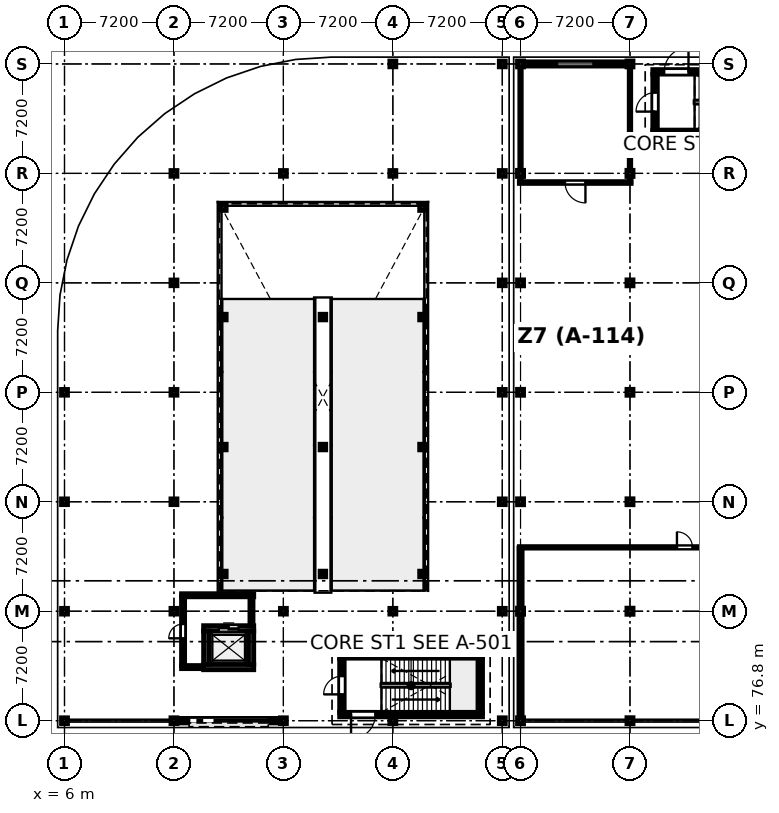
"""IFC4 building model, lengths in metres.
Left out: names, types, materials, properties, quantities, classifications, styles, units other than length and angle.
Written with IfcOpenShell. Run it as: python <this file> out.ifc"""

import sys

from ifc_helpers import new_model, si_unit, direction, frame, frame_2d, origin, origin_2d, place, context, subcontext, project, spatial, rectangle, i_section, extrude, element, fill, save


model = new_model("IFC4")
c1 = context("Model", 3, precision=1e-05, world=origin(), true_north=direction((0.0, 1.0)))
c2 = subcontext(c1, "Body", "Model", "MODEL_VIEW")
j1 = project(units=[si_unit("LENGTHUNIT", "METRE"), si_unit("PLANEANGLEUNIT", "RADIAN")], contexts=[c1])
p1 = place(None, origin())
s1 = spatial("IfcSite", under=j1, at=p1, CompositionType="ELEMENT")
p2 = place(p1, origin())
s2 = spatial("IfcBuilding", under=s1, at=p2, CompositionType="ELEMENT")
p3 = place(p2, origin())
s3 = spatial("IfcBuildingStorey", under=s2, at=p3, CompositionType="ELEMENT", Elevation=0.0)
for number, where, z_axis, x_axis in (
    (1, (6.0, 76.8, 0.0), (0.0, 0.0, 1.0), (1.0, 0.0, 0.0)),
    (2, (6.0, 84.0, 0.0), (0.0, 0.0, 1.0), (1.0, 0.0, 0.0)),
    (3, (6.0, 91.2, 0.0), (0.0, 0.0, 1.0), (1.0, 0.0, 0.0)),
    (4, (6.0, 98.4, 0.0), (0.0, 0.0, 1.0), (1.0, 0.0, 0.0)),
    (5, (13.2, 76.8, 0.0), (0.0, 0.0, 1.0), (1.0, 0.0, 0.0)),
    (6, (13.2, 84.0, 0.0), (0.0, 0.0, 1.0), (1.0, 0.0, 0.0)),
    (7, (13.2, 91.2, 0.0), (0.0, 0.0, 1.0), (1.0, 0.0, 0.0)),
    (8, (13.2, 98.4, 0.0), (0.0, 0.0, 1.0), (1.0, 0.0, 0.0)),
    (9, (13.2, 105.6, 0.0), (0.0, 0.0, 1.0), (1.0, 0.0, 0.0)),
    (10, (13.2, 112.8, 0.0), (0.0, 0.0, 1.0), (1.0, 0.0, 0.0)),
    (11, (20.4, 76.8, 0.0), (0.0, 0.0, 1.0), (1.0, 0.0, 0.0)),
    (12, (20.4, 84.0, 0.0), (0.0, 0.0, 1.0), (1.0, 0.0, 0.0)),
    (13, (20.4, 112.8, 0.0), (0.0, 0.0, 1.0), (1.0, 0.0, 0.0)),
    (14, (27.6, 76.8, 0.0), (0.0, 0.0, 1.0), (1.0, 0.0, 0.0)),
    (15, (27.6, 84.0, 0.0), (0.0, 0.0, 1.0), (1.0, 0.0, 0.0)),
    (16, (27.6, 112.8, 0.0), (0.0, 0.0, 1.0), (1.0, 0.0, 0.0)),
    (17, (27.6, 120.0, 0.0), (0.0, 0.0, 1.0), (1.0, 0.0, 0.0)),
    (18, (34.8, 76.8, 0.0), (0.0, 0.0, 1.0), (1.0, 0.0, 0.0)),
    (19, (34.8, 84.0, 0.0), (0.0, 0.0, 1.0), (1.0, 0.0, 0.0)),
    (20, (34.8, 91.2, 0.0), (0.0, 0.0, 1.0), (1.0, 0.0, 0.0)),
    (21, (34.8, 98.4, 0.0), (0.0, 0.0, 1.0), (1.0, 0.0, 0.0)),
    (22, (34.8, 105.6, 0.0), (0.0, 0.0, 1.0), (1.0, 0.0, 0.0)),
    (23, (34.8, 112.8, 0.0), (0.0, 0.0, 1.0), (1.0, 0.0, 0.0)),
    (24, (34.8, 120.0, 0.0), (0.0, 0.0, 1.0), (1.0, 0.0, 0.0)),
):
    element("IfcColumn", number, at=place(p3, frame(where, z_axis=z_axis, x_axis=x_axis)), inside=s3, PredefinedType="COLUMN", context=c2, shape_type="SweptSolid", body=[
        extrude(i_section(OverallWidth=0.396, OverallDepth=0.381, WebThickness=0.019, FlangeThickness=0.03, FilletRadius=0.015, at=origin_2d()), origin(), (0.0, 0.0, 1.0), 5.4),
    ])
for number, where, z_axis, x_axis in (
    (25, (16.45, 86.45, 0.0), (0.0, 0.0, 1.0), (1.0, 0.0, 0.0)),
    (26, (23.0, 86.45, 0.0), (0.0, 0.0, 1.0), (1.0, 0.0, 0.0)),
    (27, (29.55, 86.45, 0.0), (0.0, 0.0, 1.0), (1.0, 0.0, 0.0)),
    (28, (16.45, 94.8, 0.0), (0.0, 0.0, 1.0), (1.0, 0.0, 0.0)),
    (29, (23.0, 94.8, 0.0), (0.0, 0.0, 1.0), (1.0, 0.0, 0.0)),
    (30, (29.55, 94.8, 0.0), (0.0, 0.0, 1.0), (1.0, 0.0, 0.0)),
    (31, (16.45, 103.35, 0.0), (0.0, 0.0, 1.0), (1.0, 0.0, 0.0)),
    (32, (23.0, 103.35, 0.0), (0.0, 0.0, 1.0), (1.0, 0.0, 0.0)),
    (33, (29.55, 103.35, 0.0), (0.0, 0.0, 1.0), (1.0, 0.0, 0.0)),
    (34, (16.45, 110.55, 0.0), (0.0, 0.0, 1.0), (1.0, 0.0, 0.0)),
    (35, (29.55, 110.55, 0.0), (0.0, 0.0, 1.0), (1.0, 0.0, 0.0)),
):
    element("IfcColumn", number, at=place(p3, frame(where, z_axis=z_axis, x_axis=x_axis)), inside=s3, PredefinedType="COLUMN", context=c2, shape_type="SweptSolid", body=[
        extrude(i_section(OverallWidth=0.373, OverallDepth=0.373, WebThickness=0.016, FlangeThickness=0.026, FilletRadius=0.015, at=origin_2d()), origin(), (0.0, 0.0, 1.0), 5.4),
    ])
p4 = place(p3, frame((36.0, 76.8, 0.0), z_axis=(0.0, 0.0, 1.0), x_axis=(1.0, 0.0, 0.0)))
e36 = element("IfcColumn", 36, at=p4, inside=s3, PredefinedType="COLUMN", context=c2, shape_type="SweptSolid", body=[
    extrude(i_section(OverallWidth=0.399, OverallDepth=0.394, WebThickness=0.023, FlangeThickness=0.037, FilletRadius=0.015, at=origin_2d()), origin(), (0.0, 0.0, 1.0), 5.4),
])
p5 = place(p3, frame((36.0, 84.0, 0.0), z_axis=(0.0, 0.0, 1.0), x_axis=(1.0, 0.0, 0.0)))
e37 = element("IfcColumn", 37, at=p5, inside=s3, PredefinedType="COLUMN", context=c2, shape_type="SweptSolid", body=[
    extrude(i_section(OverallWidth=0.404, OverallDepth=0.406, WebThickness=0.027, FlangeThickness=0.044, FilletRadius=0.015, at=origin_2d()), origin(), (0.0, 0.0, 1.0), 5.4),
])
for number, where, z_axis, x_axis in (
    (38, (36.0, 91.2, 0.0), (0.0, 0.0, 1.0), (1.0, 0.0, 0.0)),
    (39, (36.0, 98.4, 0.0), (0.0, 0.0, 1.0), (1.0, 0.0, 0.0)),
    (40, (36.0, 105.6, 0.0), (0.0, 0.0, 1.0), (1.0, 0.0, 0.0)),
):
    element("IfcColumn", number, at=place(p3, frame(where, z_axis=z_axis, x_axis=x_axis)), inside=s3, PredefinedType="COLUMN", context=c2, shape_type="SweptSolid", body=[
        extrude(i_section(OverallWidth=0.399, OverallDepth=0.394, WebThickness=0.023, FlangeThickness=0.037, FilletRadius=0.015, at=origin_2d()), origin(), (0.0, 0.0, 1.0), 5.4),
    ])
p6 = place(p3, frame((36.0, 112.8, 0.0), z_axis=(0.0, 0.0, 1.0), x_axis=(1.0, 0.0, 0.0)))
e41 = element("IfcColumn", 41, at=p6, inside=s3, PredefinedType="COLUMN", context=c2, shape_type="SweptSolid", body=[
    extrude(i_section(OverallWidth=0.404, OverallDepth=0.406, WebThickness=0.027, FlangeThickness=0.044, FilletRadius=0.015, at=origin_2d()), origin(), (0.0, 0.0, 1.0), 5.4),
])
for number, where, z_axis, x_axis in (
    (42, (36.0, 120.0, 0.0), (0.0, 0.0, 1.0), (1.0, 0.0, 0.0)),
    (43, (43.2, 76.8, 0.0), (0.0, 0.0, 1.0), (1.0, 0.0, 0.0)),
):
    element("IfcColumn", number, at=place(p3, frame(where, z_axis=z_axis, x_axis=x_axis)), inside=s3, PredefinedType="COLUMN", context=c2, shape_type="SweptSolid", body=[
        extrude(i_section(OverallWidth=0.399, OverallDepth=0.394, WebThickness=0.023, FlangeThickness=0.037, FilletRadius=0.015, at=origin_2d()), origin(), (0.0, 0.0, 1.0), 5.4),
    ])
p7 = place(p3, frame((43.2, 84.0, 0.0), z_axis=(0.0, 0.0, 1.0), x_axis=(1.0, 0.0, 0.0)))
e44 = element("IfcColumn", 44, at=p7, inside=s3, PredefinedType="COLUMN", context=c2, shape_type="SweptSolid", body=[
    extrude(i_section(OverallWidth=0.404, OverallDepth=0.406, WebThickness=0.027, FlangeThickness=0.044, FilletRadius=0.015, at=origin_2d()), origin(), (0.0, 0.0, 1.0), 5.4),
])
for number, where, z_axis, x_axis in (
    (45, (43.2, 91.2, 0.0), (0.0, 0.0, 1.0), (1.0, 0.0, 0.0)),
    (46, (43.2, 98.4, 0.0), (0.0, 0.0, 1.0), (1.0, 0.0, 0.0)),
    (47, (43.2, 105.6, 0.0), (0.0, 0.0, 1.0), (1.0, 0.0, 0.0)),
):
    element("IfcColumn", number, at=place(p3, frame(where, z_axis=z_axis, x_axis=x_axis)), inside=s3, PredefinedType="COLUMN", context=c2, shape_type="SweptSolid", body=[
        extrude(i_section(OverallWidth=0.399, OverallDepth=0.394, WebThickness=0.023, FlangeThickness=0.037, FilletRadius=0.015, at=origin_2d()), origin(), (0.0, 0.0, 1.0), 5.4),
    ])
p8 = place(p3, frame((43.2, 112.8, 0.0), z_axis=(0.0, 0.0, 1.0), x_axis=(1.0, 0.0, 0.0)))
e48 = element("IfcColumn", 48, at=p8, inside=s3, PredefinedType="COLUMN", context=c2, shape_type="SweptSolid", body=[
    extrude(i_section(OverallWidth=0.404, OverallDepth=0.406, WebThickness=0.027, FlangeThickness=0.044, FilletRadius=0.015, at=origin_2d()), origin(), (0.0, 0.0, 1.0), 5.4),
])
p9 = place(p3, frame((43.2, 120.0, 0.0), z_axis=(0.0, 0.0, 1.0), x_axis=(1.0, 0.0, 0.0)))
e49 = element("IfcColumn", 49, at=p9, inside=s3, PredefinedType="COLUMN", context=c2, shape_type="SweptSolid", body=[
    extrude(i_section(OverallWidth=0.399, OverallDepth=0.394, WebThickness=0.023, FlangeThickness=0.037, FilletRadius=0.015, at=origin_2d()), origin(), (0.0, 0.0, 1.0), 5.4),
])
p10 = place(p3, frame((36.207, 120.0, 0.0), z_axis=(0.0, 0.0, 1.0), x_axis=(1.0, 0.0, 0.0)))
e50 = element("IfcWall", 50, at=p10, inside=s3, PredefinedType="STANDARD", context=c2, shape_type="SweptSolid", body=[
    extrude(rectangle(XDim=6.786, YDim=0.28, at=frame_2d((3.393, 0.0))), origin(), (0.0, 0.0, 1.0), 4.462),
])
p11 = place(p10, frame((2.193, 0.0, 1.05)))
e51 = element("IfcOpeningElement", 51, at=p11, cuts=e50, PredefinedType="OPENING", context=c2, shape_type="SweptSolid", body=[
    extrude(rectangle(XDim=2.4, YDim=1.5, at=frame_2d((1.2, 0.75))), frame((0.0, 0.15, 0.0), z_axis=(0.0, -1.0, 0.0), x_axis=(1.0, 0.0, 0.0)), (0.0, 0.0, 1.0), 0.3),
])
p12 = place(p3, frame((20.195, 76.8, 0.0), z_axis=(0.0, 0.0, 1.0), x_axis=(-1.0, 0.0, 0.0)))
e52 = element("IfcWall", 52, at=p12, inside=s3, PredefinedType="STANDARD", context=c2, shape_type="SweptSolid", body=[
    extrude(rectangle(XDim=6.79, YDim=0.3, at=frame_2d((3.395, 0.0))), origin(), (0.0, 0.0, 1.0), 4.523),
])
p13 = place(p12, frame((0.795, 0.0, 0.0)))
e53 = element("IfcOpeningElement", 53, at=p13, cuts=e52, PredefinedType="OPENING", context=c2, shape_type="SweptSolid", body=[
    extrude(rectangle(XDim=5.2, YDim=4.1, at=frame_2d((2.6, 2.05))), frame((0.0, 0.16, 0.0), z_axis=(0.0, -1.0, 0.0), x_axis=(1.0, 0.0, 0.0)), (0.0, 0.0, 1.0), 0.32),
])
p14 = place(p3, frame((33.5, 77.2, 0.0), z_axis=(0.0, 0.0, 1.0), x_axis=(-1.0, 0.0, 0.0)))
e54 = element("IfcWall", 54, at=p14, inside=s3, PredefinedType="SOLIDWALL", context=c2, shape_type="SweptSolid", body=[
    extrude(rectangle(XDim=9.4, YDim=0.3, at=frame_2d((4.7, 0.0))), origin(), (0.0, 0.0, 1.0), 5.15),
])
p15 = place(p14, frame((7.05, 0.0, 0.0)))
e55 = element("IfcOpeningElement", 55, at=p15, cuts=e54, PredefinedType="OPENING", context=c2, shape_type="SweptSolid", body=[
    extrude(rectangle(XDim=1.6, YDim=2.15, at=frame_2d((0.8, 1.075))), frame((0.0, 0.16, 0.0), z_axis=(0.0, -1.0, 0.0), x_axis=(1.0, 0.0, 0.0)), (0.0, 0.0, 1.0), 0.32),
])
p16 = place(p3, frame((24.1, 81.06, 0.0), z_axis=(0.0, 0.0, 1.0), x_axis=(1.0, 0.0, 0.0)))
e56 = element("IfcWall", 56, at=p16, inside=s3, PredefinedType="SOLIDWALL", context=c2, shape_type="SweptSolid", body=[
    extrude(rectangle(XDim=9.4, YDim=0.3, at=frame_2d((4.7, 0.0))), origin(), (0.0, 0.0, 1.0), 5.15),
])
p17 = place(p3, frame((24.25, 77.35, 0.0), z_axis=(0.0, 0.0, 1.0), x_axis=(0.0, 1.0, 0.0)))
e57 = element("IfcWall", 57, at=p17, inside=s3, PredefinedType="SOLIDWALL", context=c2, shape_type="SweptSolid", body=[
    extrude(rectangle(XDim=3.56, YDim=0.3, at=frame_2d((1.78, 0.0))), origin(), (0.0, 0.0, 1.0), 5.15),
])
p18 = place(p17, frame((1.18, 0.0, 0.0)))
e58 = element("IfcOpeningElement", 58, at=p18, cuts=e57, PredefinedType="OPENING", context=c2, shape_type="SweptSolid", body=[
    extrude(rectangle(XDim=1.2, YDim=2.2, at=frame_2d((0.6, 1.1))), frame((0.0, 0.16, 0.0), z_axis=(0.0, -1.0, 0.0), x_axis=(1.0, 0.0, 0.0)), (0.0, 0.0, 1.0), 0.32),
])
p19 = place(p3, frame((33.35, 80.91, 0.0), z_axis=(0.0, 0.0, 1.0), x_axis=(0.0, -1.0, 0.0)))
e59 = element("IfcWall", 59, at=p19, inside=s3, PredefinedType="SOLIDWALL", context=c2, shape_type="SweptSolid", body=[
    extrude(rectangle(XDim=3.56, YDim=0.3, at=frame_2d((1.78, 0.0))), origin(), (0.0, 0.0, 1.0), 5.15),
])
p20 = place(p3, frame((54.1, 115.5, 0.0), z_axis=(0.0, 0.0, 1.0), x_axis=(-1.0, 0.0, 0.0)))
e60 = element("IfcWall", 60, at=p20, inside=s3, PredefinedType="SOLIDWALL", context=c2, shape_type="SweptSolid", body=[
    extrude(rectangle(XDim=9.4, YDim=0.3, at=frame_2d((4.7, 0.0))), origin(), (0.0, 0.0, 1.0), 5.16),
])
p21 = place(p3, frame((44.7, 119.48, 0.0), z_axis=(0.0, 0.0, 1.0), x_axis=(1.0, 0.0, 0.0)))
e61 = element("IfcWall", 61, at=p21, inside=s3, PredefinedType="SOLIDWALL", context=c2, shape_type="SweptSolid", body=[
    extrude(rectangle(XDim=9.4, YDim=0.3, at=frame_2d((4.7, 0.0))), origin(), (0.0, 0.0, 1.0), 5.16),
])
p22 = place(p21, frame((0.75, 0.0, 0.0)))
e62 = element("IfcOpeningElement", 62, at=p22, cuts=e61, PredefinedType="OPENING", context=c2, shape_type="SweptSolid", body=[
    extrude(rectangle(XDim=1.6, YDim=2.15, at=frame_2d((0.8, 1.075))), frame((0.0, 0.16, 0.0), z_axis=(0.0, -1.0, 0.0), x_axis=(1.0, 0.0, 0.0)), (0.0, 0.0, 1.0), 0.32),
])
p23 = place(p3, frame((44.85, 115.65, 0.0), z_axis=(0.0, 0.0, 1.0), x_axis=(0.0, 1.0, 0.0)))
e63 = element("IfcWall", 63, at=p23, inside=s3, PredefinedType="SOLIDWALL", context=c2, shape_type="SweptSolid", body=[
    extrude(rectangle(XDim=3.68, YDim=0.3, at=frame_2d((1.84, 0.0))), origin(), (0.0, 0.0, 1.0), 5.16),
])
p24 = place(p23, frame((1.215, 0.0, 0.0)))
e64 = element("IfcOpeningElement", 64, at=p24, cuts=e63, PredefinedType="OPENING", context=c2, shape_type="SweptSolid", body=[
    extrude(rectangle(XDim=1.25, YDim=2.2, at=frame_2d((0.625, 1.1))), frame((0.0, 0.16, 0.0), z_axis=(0.0, -1.0, 0.0), x_axis=(1.0, 0.0, 0.0)), (0.0, 0.0, 1.0), 0.32),
])
p25 = place(p3, frame((18.45, 80.325, 0.0), z_axis=(0.0, 0.0, 1.0), x_axis=(-1.0, 0.0, 0.0)))
e65 = element("IfcWall", 65, at=p25, inside=s3, PredefinedType="SHEAR", context=c2, shape_type="SweptSolid", body=[
    extrude(rectangle(XDim=3.3, YDim=0.35, at=frame_2d((1.65, 0.0))), origin(), (0.0, 0.0, 1.0), 5.15),
])
p26 = place(p3, frame((15.15, 82.875, 0.0), z_axis=(0.0, 0.0, 1.0), x_axis=(1.0, 0.0, 0.0)))
e66 = element("IfcWall", 66, at=p26, inside=s3, PredefinedType="SHEAR", context=c2, shape_type="SweptSolid", body=[
    extrude(rectangle(XDim=3.3, YDim=0.35, at=frame_2d((1.65, 0.0))), origin(), (0.0, 0.0, 1.0), 5.15),
])
p27 = place(p26, frame((1.0, 0.0, 0.0)))
e67 = element("IfcOpeningElement", 67, at=p27, cuts=e66, PredefinedType="OPENING", context=c2, shape_type="SweptSolid", body=[
    extrude(rectangle(XDim=1.3, YDim=2.2, at=frame_2d((0.65, 1.1))), frame((0.0, 0.185, 0.0), z_axis=(0.0, -1.0, 0.0), x_axis=(1.0, 0.0, 0.0)), (0.0, 0.0, 1.0), 0.37),
])
for number, where, z_axis, x_axis in (
    (68, (15.325, 80.5, 0.0), (0.0, 0.0, 1.0), (0.0, 1.0, 0.0)),
    (69, (18.275, 82.7, 0.0), (0.0, 0.0, 1.0), (0.0, -1.0, 0.0)),
):
    element("IfcWall", number, at=place(p3, frame(where, z_axis=z_axis, x_axis=x_axis)), inside=s3, PredefinedType="SHEAR", context=c2, shape_type="SweptSolid", body=[
        extrude(rectangle(XDim=2.2, YDim=0.35, at=frame_2d((1.1, 0.0))), origin(), (0.0, 0.0, 1.0), 5.15),
    ])
p28 = place(p3, frame((13.698, 85.05, 0.0), z_axis=(0.0, 0.0, 1.0), x_axis=(1.0, 0.0, 0.0)))
e70 = element("IfcWall", 70, at=p28, inside=s3, PredefinedType="PARTITIONING", context=c2, shape_type="SweptSolid", body=[
    extrude(rectangle(XDim=4.752, YDim=0.205, at=frame_2d((2.376, 0.0))), origin(), (0.0, 0.0, 1.0), 4.518),
])
p29 = place(p3, frame((15.148, 80.325, 0.0), z_axis=(0.0, 0.0, 1.0), x_axis=(-1.0, 0.0, 0.0)))
e71 = element("IfcWall", 71, at=p29, inside=s3, PredefinedType="PARTITIONING", context=c2, shape_type="SweptSolid", body=[
    extrude(rectangle(XDim=1.45, YDim=0.205, at=frame_2d((0.725, 0.0))), origin(), (0.0, 0.0, 1.0), 4.518),
])
p30 = place(p3, frame((13.8, 80.43, 0.0), z_axis=(0.0, 0.0, 1.0), x_axis=(0.0, 1.0, 0.0)))
e72 = element("IfcWall", 72, at=p30, inside=s3, PredefinedType="PARTITIONING", context=c2, shape_type="SweptSolid", body=[
    extrude(rectangle(XDim=4.516, YDim=0.205, at=frame_2d((2.258, 0.0))), origin(), (0.0, 0.0, 1.0), 4.518),
])
p31 = place(p30, frame((1.788, 0.0, 0.0)))
e73 = element("IfcOpeningElement", 73, at=p31, cuts=e72, PredefinedType="OPENING", context=c2, shape_type="SweptSolid", body=[
    extrude(rectangle(XDim=0.94, YDim=2.1, at=frame_2d((0.47, 1.05))), frame((0.0, 0.113, 0.0), z_axis=(0.0, -1.0, 0.0), x_axis=(1.0, 0.0, 0.0)), (0.0, 0.0, 1.0), 0.225),
])
p32 = place(p3, frame((18.3, 84.946, 0.0), z_axis=(0.0, 0.0, 1.0), x_axis=(0.0, -1.0, 0.0)))
e74 = element("IfcWall", 74, at=p32, inside=s3, PredefinedType="PARTITIONING", context=c2, shape_type="SweptSolid", body=[
    extrude(rectangle(XDim=1.894, YDim=0.205, at=frame_2d((0.947, 0.0))), origin(), (0.0, 0.0, 1.0), 4.518),
])
p33 = place(p3, frame((35.92, 88.2, 0.0), z_axis=(0.0, 0.0, 1.0), x_axis=(1.0, 0.0, 0.0)))
e75 = element("IfcWall", 75, at=p33, inside=s3, PredefinedType="PARTITIONING", context=c2, shape_type="SweptSolid", body=[
    extrude(rectangle(XDim=21.76, YDim=0.1, at=frame_2d((10.88, 0.0))), origin(), (0.0, 0.0, 1.0), 4.457),
])
p34 = place(p33, frame((10.37, 0.0, 0.0)))
e76 = element("IfcOpeningElement", 76, at=p34, cuts=e75, PredefinedType="OPENING", context=c2, shape_type="SweptSolid", body=[
    extrude(rectangle(XDim=1.02, YDim=2.16, at=frame_2d((0.51, 1.08))), frame((0.0, 0.06, 0.0), z_axis=(0.0, -1.0, 0.0), x_axis=(1.0, 0.0, 0.0)), (0.0, 0.0, 1.0), 0.12),
])
p35 = place(p33, frame((12.64, 0.0, 0.95)))
e77 = element("IfcOpeningElement", 77, at=p35, cuts=e75, PredefinedType="OPENING", context=c2, shape_type="SweptSolid", body=[
    extrude(rectangle(XDim=1.6, YDim=1.0, at=frame_2d((0.8, 0.5))), frame((0.0, 0.06, 0.0), z_axis=(0.0, -1.0, 0.0), x_axis=(1.0, 0.0, 0.0)), (0.0, 0.0, 1.0), 0.12),
])
p36 = place(p3, frame((43.28, 112.2, 0.0), z_axis=(0.0, 0.0, 1.0), x_axis=(-1.0, 0.0, 0.0)))
e78 = element("IfcWall", 78, at=p36, inside=s3, PredefinedType="PARTITIONING", context=c2, shape_type="SweptSolid", body=[
    extrude(rectangle(XDim=7.36, YDim=0.12, at=frame_2d((3.68, 0.0))), origin(), (0.0, 0.0, 1.0), 4.457),
])
p37 = place(p36, frame((3.01, 0.0, 0.0)))
e79 = element("IfcOpeningElement", 79, at=p37, cuts=e78, PredefinedType="OPENING", context=c2, shape_type="SweptSolid", body=[
    extrude(rectangle(XDim=1.34, YDim=2.16, at=frame_2d((0.67, 1.08))), frame((0.0, 0.07, 0.0), z_axis=(0.0, -1.0, 0.0), x_axis=(1.0, 0.0, 0.0)), (0.0, 0.0, 1.0), 0.14),
])
p38 = place(p3, frame((36.0, 76.942, 0.0), z_axis=(0.0, 0.0, 1.0), x_axis=(0.0, 1.0, 0.0)))
e80 = element("IfcWall", 80, at=p38, inside=s3, PredefinedType="PARTITIONING", context=c2, shape_type="SweptSolid", body=[
    extrude(rectangle(XDim=11.206, YDim=0.212, at=frame_2d((5.603, 0.0))), origin(), (0.0, 0.0, 1.0), 4.457),
])
p39 = place(p3, frame((36.0, 112.262, 0.0), z_axis=(0.0, 0.0, 1.0), x_axis=(0.0, 1.0, 0.0)))
e81 = element("IfcWall", 81, at=p39, inside=s3, PredefinedType="PARTITIONING", context=c2, shape_type="SweptSolid", body=[
    extrude(rectangle(XDim=7.596, YDim=0.095, at=frame_2d((3.798, 0.0))), origin(), (0.0, 0.0, 1.0), 4.457),
])
p40 = place(p3, frame((43.2, 119.858, 0.0), z_axis=(0.0, 0.0, 1.0), x_axis=(0.0, -1.0, 0.0)))
e82 = element("IfcWall", 82, at=p40, inside=s3, PredefinedType="PARTITIONING", context=c2, shape_type="SweptSolid", body=[
    extrude(rectangle(XDim=7.596, YDim=0.1, at=frame_2d((3.798, 0.0))), origin(), (0.0, 0.0, 1.0), 4.457),
])
p41 = place(p11, origin())
e83 = element("IfcWindow", 83, at=p41, inside=s3, PartitioningType="SINGLE_PANEL", PredefinedType="WINDOW", context=c2, shape_type="SweptSolid", body=[
    extrude(rectangle(XDim=2.4, YDim=1.5, at=frame_2d((1.2, 0.75))), frame((0.0, 0.03, 0.0), z_axis=(0.0, -1.0, 0.0), x_axis=(1.0, 0.0, 0.0)), (0.0, 0.0, 1.0), 0.06),
])
fill(e51, e83)
p42 = place(p13, origin())
e84 = element("IfcDoor", 84, at=p42, inside=s3, OperationType="ROLLINGUP", PredefinedType="GATE", context=c2, shape_type="SweptSolid", body=[
    extrude(rectangle(XDim=5.2, YDim=4.1, at=frame_2d((2.6, 2.05))), frame((0.0, 0.025, 0.0), z_axis=(0.0, -1.0, 0.0), x_axis=(1.0, 0.0, 0.0)), (0.0, 0.0, 1.0), 0.05),
])
fill(e53, e84)
p43 = place(p15, origin())
e85 = element("IfcDoor", 85, at=p43, inside=s3, OperationType="SINGLE_SWING_RIGHT", PredefinedType="DOOR", context=c2, shape_type="SweptSolid", body=[
    extrude(rectangle(XDim=1.6, YDim=2.15, at=frame_2d((0.8, 1.075))), frame((0.0, 0.025, 0.0), z_axis=(0.0, -1.0, 0.0), x_axis=(1.0, 0.0, 0.0)), (0.0, 0.0, 1.0), 0.05),
])
fill(e55, e85)
p44 = place(p18, origin())
e86 = element("IfcDoor", 86, at=p44, inside=s3, OperationType="SINGLE_SWING_LEFT", PredefinedType="DOOR", context=c2, shape_type="SweptSolid", body=[
    extrude(rectangle(XDim=1.2, YDim=2.2, at=frame_2d((0.6, 1.1))), frame((0.0, 0.025, 0.0), z_axis=(0.0, -1.0, 0.0), x_axis=(1.0, 0.0, 0.0)), (0.0, 0.0, 1.0), 0.05),
])
fill(e58, e86)
p45 = place(p22, origin())
e87 = element("IfcDoor", 87, at=p45, inside=s3, OperationType="SINGLE_SWING_RIGHT", PredefinedType="DOOR", context=c2, shape_type="SweptSolid", body=[
    extrude(rectangle(XDim=1.6, YDim=2.15, at=frame_2d((0.8, 1.075))), frame((0.0, 0.025, 0.0), z_axis=(0.0, -1.0, 0.0), x_axis=(1.0, 0.0, 0.0)), (0.0, 0.0, 1.0), 0.05),
])
fill(e62, e87)
p46 = place(p24, origin())
e88 = element("IfcDoor", 88, at=p46, inside=s3, OperationType="SINGLE_SWING_LEFT", PredefinedType="DOOR", context=c2, shape_type="SweptSolid", body=[
    extrude(rectangle(XDim=1.25, YDim=2.2, at=frame_2d((0.625, 1.1))), frame((0.0, 0.025, 0.0), z_axis=(0.0, -1.0, 0.0), x_axis=(1.0, 0.0, 0.0)), (0.0, 0.0, 1.0), 0.05),
])
fill(e64, e88)
p47 = place(p27, origin())
e89 = element("IfcDoor", 89, at=p47, inside=s3, OperationType="DOUBLE_DOOR_SLIDING", PredefinedType="DOOR", context=c2, shape_type="SweptSolid", body=[
    extrude(rectangle(XDim=1.3, YDim=2.2, at=frame_2d((0.65, 1.1))), frame((0.0, 0.025, 0.0), z_axis=(0.0, -1.0, 0.0), x_axis=(1.0, 0.0, 0.0)), (0.0, 0.0, 1.0), 0.05),
])
fill(e67, e89)
p48 = place(p31, origin())
e90 = element("IfcDoor", 90, at=p48, inside=s3, OperationType="SINGLE_SWING_LEFT", PredefinedType="DOOR", context=c2, shape_type="SweptSolid", body=[
    extrude(rectangle(XDim=0.94, YDim=2.1, at=frame_2d((0.47, 1.05))), frame((0.0, 0.025, 0.0), z_axis=(0.0, -1.0, 0.0), x_axis=(1.0, 0.0, 0.0)), (0.0, 0.0, 1.0), 0.05),
])
fill(e73, e90)
p49 = place(p34, origin())
e91 = element("IfcDoor", 91, at=p49, inside=s3, OperationType="SINGLE_SWING_LEFT", PredefinedType="DOOR", context=c2, shape_type="SweptSolid", body=[
    extrude(rectangle(XDim=1.02, YDim=2.16, at=frame_2d((0.51, 1.08))), frame((0.0, 0.025, 0.0), z_axis=(0.0, -1.0, 0.0), x_axis=(1.0, 0.0, 0.0)), (0.0, 0.0, 1.0), 0.05),
])
fill(e76, e91)
p50 = place(p37, origin())
e92 = element("IfcDoor", 92, at=p50, inside=s3, OperationType="SINGLE_SWING_LEFT", PredefinedType="DOOR", context=c2, shape_type="SweptSolid", body=[
    extrude(rectangle(XDim=1.34, YDim=2.16, at=frame_2d((0.67, 1.08))), frame((0.0, 0.025, 0.0), z_axis=(0.0, -1.0, 0.0), x_axis=(1.0, 0.0, 0.0)), (0.0, 0.0, 1.0), 0.05),
])
fill(e79, e92)
save(model, sys.argv[1])
